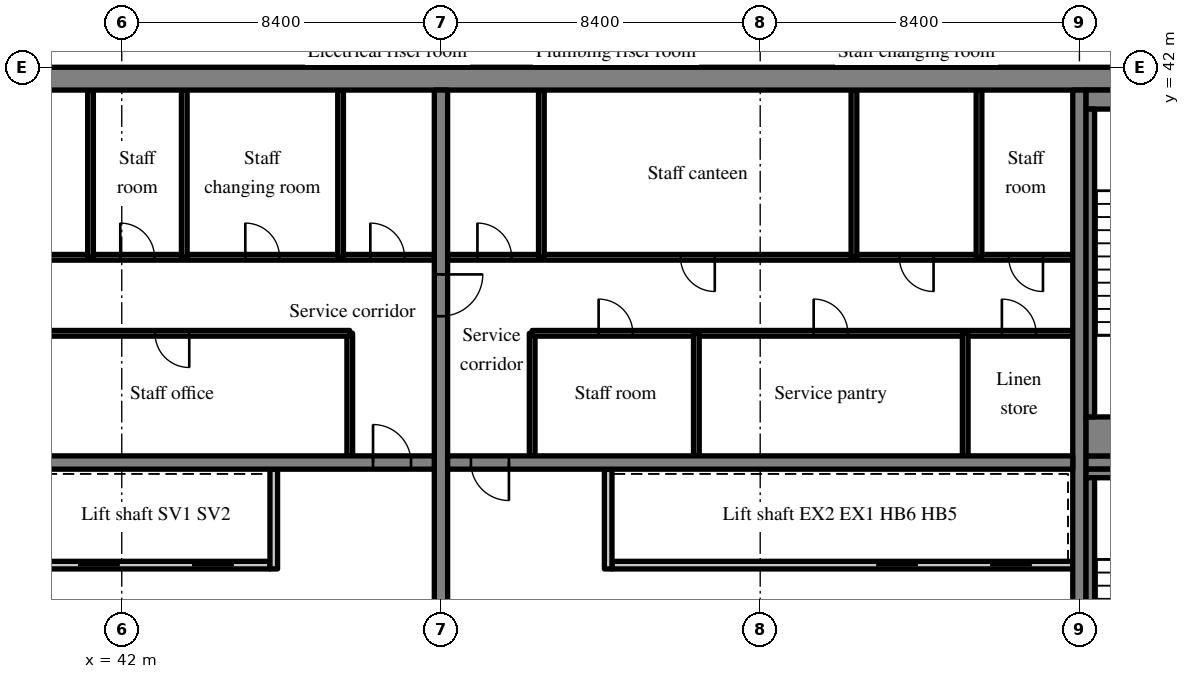
"""IFC4 building model, lengths in metres.
Left out: names, types, materials, properties, quantities, classifications, styles, units other than length and angle.
Written with IfcOpenShell. Run it as: python <this file> out.ifc"""

import sys

from ifc_helpers import new_model, si_unit, direction, frame, frame_2d, origin, place, context, subcontext, project, spatial, rectangle, extrude, source, transform, mapped, element, fill, save


model = new_model("IFC4")
c1 = context("Model", 3, precision=1e-05, world=origin(), true_north=direction((0.0, 1.0)))
c2 = subcontext(c1, "Body", "Model", "MODEL_VIEW")
j1 = project(units=[si_unit("LENGTHUNIT", "METRE"), si_unit("PLANEANGLEUNIT", "RADIAN")], contexts=[c1])
p1 = place(None, origin())
s1 = spatial("IfcSite", under=j1, at=p1, CompositionType="ELEMENT")
p2 = place(p1, origin())
s2 = spatial("IfcBuilding", under=s1, at=p2, CompositionType="ELEMENT")
p3 = place(p2, frame((0.0, 0.0, 221.8)))
s3 = spatial("IfcBuildingStorey", under=s2, at=p3, CompositionType="ELEMENT", Elevation=221.8)
m1 = source(origin(), c2, "Body", "SweptSolid", [
    extrude(rectangle(XDim=50.4, YDim=0.6, at=frame_2d((25.2, 0.0))), origin(), (0.0, 0.0, 1.0), 3.62),
])
p4 = place(p3, frame((25.2, 41.7, 0.0), z_axis=(0.0, 0.0, 1.0), x_axis=(1.0, 0.0, 0.0)))
e1 = element("IfcWall", 1, at=p4, inside=s3, PredefinedType="SHEAR", context=c2, shape_type="MappedRepresentation", body=[
    mapped(m1, transform((0.0, 0.0, 0.0), scale=1.0)),
])
m2 = source(origin(), c2, "Body", "SweptSolid", [
    extrude(rectangle(XDim=18.8, YDim=0.35, at=frame_2d((9.4, 0.0))), origin(), (0.0, 0.0, 1.0), 3.62),
])
p5 = place(p3, frame((50.4, 22.6, 0.0), z_axis=(0.0, 0.0, 1.0), x_axis=(0.0, 1.0, 0.0)))
e2 = element("IfcWall", 2, at=p5, inside=s3, PredefinedType="SHEAR", context=c2, shape_type="MappedRepresentation", body=[
    mapped(m2, transform((0.0, 0.0, 0.0), scale=1.0)),
])
m3 = source(origin(), c2, "Body", "SweptSolid", [
    extrude(rectangle(XDim=1.1, YDim=2.1, at=frame_2d((0.55, 1.05))), frame((0.0, 0.185, 0.0), z_axis=(0.0, -1.0, 0.0), x_axis=(1.0, 0.0, 0.0)), (0.0, 0.0, 1.0), 0.37),
])
p6 = place(p5, frame((12.85, 0.0, 0.0)))
e3 = element("IfcOpeningElement", 3, at=p6, cuts=e2, PredefinedType="OPENING", context=c2, shape_type="MappedRepresentation", body=[
    mapped(m3, transform((0.0, 0.0, 0.0), scale=1.0)),
])
p7 = place(p3, frame((67.2, 22.6, 0.0), z_axis=(0.0, 0.0, 1.0), x_axis=(0.0, 1.0, 0.0)))
e4 = element("IfcWall", 4, at=p7, inside=s3, PredefinedType="SHEAR", context=c2, shape_type="MappedRepresentation", body=[
    mapped(m2, transform((0.0, 0.0, 0.0), scale=1.0)),
])
m4 = source(origin(), c2, "Body", "SweptSolid", [
    extrude(rectangle(XDim=16.45, YDim=0.35, at=frame_2d((8.225, 0.0))), origin(), (0.0, 0.0, 1.0), 3.62),
])
p8 = place(p3, frame((33.775, 31.6, 0.0), z_axis=(0.0, 0.0, 1.0), x_axis=(1.0, 0.0, 0.0)))
e5 = element("IfcWall", 5, at=p8, inside=s3, PredefinedType="SHEAR", context=c2, shape_type="MappedRepresentation", body=[
    mapped(m4, transform((0.0, 0.0, 0.0), scale=1.0)),
])
m5 = source(origin(), c2, "Body", "SweptSolid", [
    extrude(rectangle(XDim=1.0, YDim=2.1, at=frame_2d((0.5, 1.05))), frame((0.0, 0.185, 0.0), z_axis=(0.0, -1.0, 0.0), x_axis=(1.0, 0.0, 0.0)), (0.0, 0.0, 1.0), 0.37),
])
p9 = place(p8, frame((14.837, 0.0, 0.0)))
e6 = element("IfcOpeningElement", 6, at=p9, cuts=e5, PredefinedType="OPENING", context=c2, shape_type="MappedRepresentation", body=[
    mapped(m5, transform((0.0, 0.0, 0.0), scale=1.0)),
])
m6 = source(origin(), c2, "Body", "SweptSolid", [
    extrude(rectangle(XDim=16.45, YDim=0.35, at=frame_2d((8.225, 0.0))), origin(), (0.0, 0.0, 1.0), 3.62),
])
p10 = place(p3, frame((50.575, 31.6, 0.0), z_axis=(0.0, 0.0, 1.0), x_axis=(1.0, 0.0, 0.0)))
e7 = element("IfcWall", 7, at=p10, inside=s3, PredefinedType="SHEAR", context=c2, shape_type="MappedRepresentation", body=[
    mapped(m6, transform((0.0, 0.0, 0.0), scale=1.0)),
])
p11 = place(p10, frame((0.613, 0.0, 0.0)))
e8 = element("IfcOpeningElement", 8, at=p11, cuts=e7, PredefinedType="OPENING", context=c2, shape_type="MappedRepresentation", body=[
    mapped(m5, transform((0.0, 0.0, 0.0), scale=1.0)),
])
m7 = source(origin(), c2, "Body", "SweptSolid", [
    extrude(rectangle(XDim=7.625, YDim=0.35, at=frame_2d((3.812, 0.0))), origin(), (0.0, 0.0, 1.0), 3.62),
])
p12 = place(p3, frame((67.375, 31.6, 0.0), z_axis=(0.0, 0.0, 1.0), x_axis=(1.0, 0.0, 0.0)))
e9 = element("IfcWall", 9, at=p12, inside=s3, PredefinedType="SHEAR", context=c2, shape_type="MappedRepresentation", body=[
    mapped(m7, transform((0.0, 0.0, 0.0), scale=1.0)),
])
p13 = place(p12, frame((5.8, 0.0, 0.0)))
e10 = element("IfcOpeningElement", 10, at=p13, cuts=e9, PredefinedType="OPENING", context=c2, shape_type="MappedRepresentation", body=[
    mapped(m3, transform((0.0, 0.0, 0.0), scale=1.0)),
])
m8 = source(origin(), c2, "Body", "SweptSolid", [
    extrude(rectangle(XDim=6.0, YDim=0.2, at=frame_2d((3.0, 0.0))), origin(), (0.0, 0.0, 1.0), 3.62),
])
p14 = place(p3, frame((39.9, 28.9, 0.0), z_axis=(0.0, 0.0, 1.0), x_axis=(1.0, 0.0, 0.0)))
e11 = element("IfcWall", 11, at=p14, inside=s3, PredefinedType="SOLIDWALL", context=c2, shape_type="MappedRepresentation", body=[
    mapped(m8, transform((0.0, 0.0, 0.0), scale=1.0)),
])
m9 = source(origin(), c2, "Body", "SweptSolid", [
    extrude(rectangle(XDim=1.1, YDim=2.1, at=frame_2d((0.55, 1.05))), frame((0.0, 0.11, 0.0), z_axis=(0.0, -1.0, 0.0), x_axis=(1.0, 0.0, 0.0)), (0.0, 0.0, 1.0), 0.22),
])
p15 = place(p14, frame((0.95, 0.0, 0.0)))
e12 = element("IfcOpeningElement", 12, at=p15, cuts=e11, PredefinedType="OPENING", context=c2, shape_type="MappedRepresentation", body=[
    mapped(m9, transform((0.0, 0.0, 0.0), scale=1.0)),
])
p16 = place(p14, frame((3.95, 0.0, 0.0)))
e13 = element("IfcOpeningElement", 13, at=p16, cuts=e11, PredefinedType="OPENING", context=c2, shape_type="MappedRepresentation", body=[
    mapped(m9, transform((0.0, 0.0, 0.0), scale=1.0)),
])
m10 = source(origin(), c2, "Body", "SweptSolid", [
    extrude(rectangle(XDim=2.625, YDim=0.2, at=frame_2d((1.312, 0.0))), origin(), (0.0, 0.0, 1.0), 3.62),
])
p17 = place(p3, frame((46.0, 28.8, 0.0), z_axis=(0.0, 0.0, 1.0), x_axis=(0.0, 1.0, 0.0)))
e14 = element("IfcWall", 14, at=p17, inside=s3, PredefinedType="SOLIDWALL", context=c2, shape_type="MappedRepresentation", body=[
    mapped(m10, transform((0.0, 0.0, 0.0), scale=1.0)),
])
m11 = source(origin(), c2, "Body", "SweptSolid", [
    extrude(rectangle(XDim=3.225, YDim=0.15, at=frame_2d((1.613, 0.0))), origin(), (0.0, 0.0, 1.0), 3.62),
])
p18 = place(p3, frame((48.0, 31.775, 0.0), z_axis=(0.0, 0.0, 1.0), x_axis=(0.0, 1.0, 0.0)))
e15 = element("IfcWall", 15, at=p18, inside=s3, PredefinedType="PARTITIONING", context=c2, shape_type="MappedRepresentation", body=[
    mapped(m11, transform((0.0, 0.0, 0.0), scale=1.0)),
])
m12 = source(origin(), c2, "Body", "SweptSolid", [
    extrude(rectangle(XDim=14.225, YDim=0.15, at=frame_2d((7.113, 0.0))), origin(), (0.0, 0.0, 1.0), 3.62),
])
p19 = place(p3, frame((33.775, 35.0, 0.0), z_axis=(0.0, 0.0, 1.0), x_axis=(1.0, 0.0, 0.0)))
e16 = element("IfcWall", 16, at=p19, inside=s3, PredefinedType="PARTITIONING", context=c2, shape_type="MappedRepresentation", body=[
    mapped(m12, transform((0.0, 0.0, 0.0), scale=1.0)),
])
m13 = source(origin(), c2, "Body", "SweptSolid", [
    extrude(rectangle(XDim=0.9, YDim=2.1, at=frame_2d((0.45, 1.05))), frame((0.0, 0.085, 0.0), z_axis=(0.0, -1.0, 0.0), x_axis=(1.0, 0.0, 0.0)), (0.0, 0.0, 1.0), 0.17),
])
p20 = place(p19, frame((2.026, 0.0, 0.0)))
e17 = element("IfcOpeningElement", 17, at=p20, cuts=e16, PredefinedType="OPENING", context=c2, shape_type="MappedRepresentation", body=[
    mapped(m13, transform((0.0, 0.0, 0.0), scale=1.0)),
])
p21 = place(p19, frame((9.101, 0.0, 0.0)))
e18 = element("IfcOpeningElement", 18, at=p21, cuts=e16, PredefinedType="OPENING", context=c2, shape_type="MappedRepresentation", body=[
    mapped(m13, transform((0.0, 0.0, 0.0), scale=1.0)),
])
m14 = source(origin(), c2, "Body", "SweptSolid", [
    extrude(rectangle(XDim=16.45, YDim=0.15, at=frame_2d((8.225, 0.0))), origin(), (0.0, 0.0, 1.0), 3.62),
])
p22 = place(p3, frame((33.775, 37.0, 0.0), z_axis=(0.0, 0.0, 1.0), x_axis=(1.0, 0.0, 0.0)))
e19 = element("IfcWall", 19, at=p22, inside=s3, PredefinedType="PARTITIONING", context=c2, shape_type="MappedRepresentation", body=[
    mapped(m14, transform((0.0, 0.0, 0.0), scale=1.0)),
])
p23 = place(p22, frame((3.251, 0.0, 0.0)))
e20 = element("IfcOpeningElement", 20, at=p23, cuts=e19, PredefinedType="OPENING", context=c2, shape_type="MappedRepresentation", body=[
    mapped(m13, transform((0.0, 0.0, 0.0), scale=1.0)),
])
p24 = place(p22, frame((8.186, 0.0, 0.0)))
e21 = element("IfcOpeningElement", 21, at=p24, cuts=e19, PredefinedType="OPENING", context=c2, shape_type="MappedRepresentation", body=[
    mapped(m13, transform((0.0, 0.0, 0.0), scale=1.0)),
])
p25 = place(p22, frame((11.476, 0.0, 0.0)))
e22 = element("IfcOpeningElement", 22, at=p25, cuts=e19, PredefinedType="OPENING", context=c2, shape_type="MappedRepresentation", body=[
    mapped(m13, transform((0.0, 0.0, 0.0), scale=1.0)),
])
p26 = place(p22, frame((14.766, 0.0, 0.0)))
e23 = element("IfcOpeningElement", 23, at=p26, cuts=e19, PredefinedType="OPENING", context=c2, shape_type="MappedRepresentation", body=[
    mapped(m13, transform((0.0, 0.0, 0.0), scale=1.0)),
])
m15 = source(origin(), c2, "Body", "SweptSolid", [
    extrude(rectangle(XDim=4.4, YDim=0.15, at=frame_2d((2.2, 0.0))), origin(), (0.0, 0.0, 1.0), 3.62),
])
for number, where, z_axis, x_axis in (
    (24, (41.178, 37.0, 0.0), (0.0, 0.0, 1.0), (0.0, 1.0, 0.0)),
    (25, (43.645, 37.0, 0.0), (0.0, 0.0, 1.0), (0.0, 1.0, 0.0)),
    (26, (47.758, 37.0, 0.0), (0.0, 0.0, 1.0), (0.0, 1.0, 0.0)),
):
    element("IfcWall", number, at=place(p3, frame(where, z_axis=z_axis, x_axis=x_axis)), inside=s3, PredefinedType="PARTITIONING", context=c2, shape_type="MappedRepresentation", body=[
        mapped(m15, transform((0.0, 0.0, 0.0), scale=1.0)),
    ])
m16 = source(origin(), c2, "Body", "SweptSolid", [
    extrude(rectangle(XDim=12.125, YDim=0.2, at=frame_2d((6.062, 0.0))), origin(), (0.0, 0.0, 1.0), 3.62),
])
p27 = place(p3, frame((67.025, 28.9, 0.0), z_axis=(0.0, 0.0, 1.0), x_axis=(-1.0, 0.0, 0.0)))
e27 = element("IfcWall", 27, at=p27, inside=s3, PredefinedType="SOLIDWALL", context=c2, shape_type="MappedRepresentation", body=[
    mapped(m16, transform((0.0, 0.0, 0.0), scale=1.0)),
])
p28 = place(p27, frame((1.075, 0.0, 0.0)))
e28 = element("IfcOpeningElement", 28, at=p28, cuts=e27, PredefinedType="OPENING", context=c2, shape_type="MappedRepresentation", body=[
    mapped(m9, transform((0.0, 0.0, 0.0), scale=1.0)),
])
p29 = place(p27, frame((4.075, 0.0, 0.0)))
e29 = element("IfcOpeningElement", 29, at=p29, cuts=e27, PredefinedType="OPENING", context=c2, shape_type="MappedRepresentation", body=[
    mapped(m9, transform((0.0, 0.0, 0.0), scale=1.0)),
])
p30 = place(p3, frame((54.8, 28.8, 0.0), z_axis=(0.0, 0.0, 1.0), x_axis=(0.0, 1.0, 0.0)))
e30 = element("IfcWall", 30, at=p30, inside=s3, PredefinedType="SOLIDWALL", context=c2, shape_type="MappedRepresentation", body=[
    mapped(m10, transform((0.0, 0.0, 0.0), scale=1.0)),
])
p31 = place(p3, frame((52.8, 31.775, 0.0), z_axis=(0.0, 0.0, 1.0), x_axis=(0.0, 1.0, 0.0)))
e31 = element("IfcWall", 31, at=p31, inside=s3, PredefinedType="PARTITIONING", context=c2, shape_type="MappedRepresentation", body=[
    mapped(m11, transform((0.0, 0.0, 0.0), scale=1.0)),
])
m17 = source(origin(), c2, "Body", "SweptSolid", [
    extrude(rectangle(XDim=14.225, YDim=0.15, at=frame_2d((7.112, 0.0))), origin(), (0.0, 0.0, 1.0), 3.62),
])
p32 = place(p3, frame((67.025, 35.0, 0.0), z_axis=(0.0, 0.0, 1.0), x_axis=(-1.0, 0.0, 0.0)))
e32 = element("IfcWall", 32, at=p32, inside=s3, PredefinedType="PARTITIONING", context=c2, shape_type="MappedRepresentation", body=[
    mapped(m17, transform((0.0, 0.0, 0.0), scale=1.0)),
])
p33 = place(p32, frame((0.965, 0.0, 0.0)))
e33 = element("IfcOpeningElement", 33, at=p33, cuts=e32, PredefinedType="OPENING", context=c2, shape_type="MappedRepresentation", body=[
    mapped(m13, transform((0.0, 0.0, 0.0), scale=1.0)),
])
p34 = place(p32, frame((5.918, 0.0, 0.0)))
e34 = element("IfcOpeningElement", 34, at=p34, cuts=e32, PredefinedType="OPENING", context=c2, shape_type="MappedRepresentation", body=[
    mapped(m13, transform((0.0, 0.0, 0.0), scale=1.0)),
])
p35 = place(p32, frame((11.577, 0.0, 0.0)))
e35 = element("IfcOpeningElement", 35, at=p35, cuts=e32, PredefinedType="OPENING", context=c2, shape_type="MappedRepresentation", body=[
    mapped(m13, transform((0.0, 0.0, 0.0), scale=1.0)),
])
m18 = source(origin(), c2, "Body", "SweptSolid", [
    extrude(rectangle(XDim=16.45, YDim=0.15, at=frame_2d((8.225, 0.0))), origin(), (0.0, 0.0, 1.0), 3.62),
])
p36 = place(p3, frame((67.025, 37.0, 0.0), z_axis=(0.0, 0.0, 1.0), x_axis=(-1.0, 0.0, 0.0)))
e36 = element("IfcWall", 36, at=p36, inside=s3, PredefinedType="PARTITIONING", context=c2, shape_type="MappedRepresentation", body=[
    mapped(m18, transform((0.0, 0.0, 0.0), scale=1.0)),
])
p37 = place(p36, frame((0.784, 0.0, 0.0)))
e37 = element("IfcOpeningElement", 37, at=p37, cuts=e36, PredefinedType="OPENING", context=c2, shape_type="MappedRepresentation", body=[
    mapped(m13, transform((0.0, 0.0, 0.0), scale=1.0)),
])
p38 = place(p36, frame((3.663, 0.0, 0.0)))
e38 = element("IfcOpeningElement", 38, at=p38, cuts=e36, PredefinedType="OPENING", context=c2, shape_type="MappedRepresentation", body=[
    mapped(m13, transform((0.0, 0.0, 0.0), scale=1.0)),
])
p39 = place(p36, frame((9.42, 0.0, 0.0)))
e39 = element("IfcOpeningElement", 39, at=p39, cuts=e36, PredefinedType="OPENING", context=c2, shape_type="MappedRepresentation", body=[
    mapped(m13, transform((0.0, 0.0, 0.0), scale=1.0)),
])
p40 = place(p36, frame((14.766, 0.0, 0.0)))
e40 = element("IfcOpeningElement", 40, at=p40, cuts=e36, PredefinedType="OPENING", context=c2, shape_type="MappedRepresentation", body=[
    mapped(m13, transform((0.0, 0.0, 0.0), scale=1.0)),
])
for number, where, z_axis, x_axis in (
    (41, (64.195, 31.775, 0.0), (0.0, 0.0, 1.0), (0.0, 1.0, 0.0)),
    (42, (57.12, 31.775, 0.0), (0.0, 0.0, 1.0), (0.0, 1.0, 0.0)),
):
    element("IfcWall", number, at=place(p3, frame(where, z_axis=z_axis, x_axis=x_axis)), inside=s3, PredefinedType="PARTITIONING", context=c2, shape_type="MappedRepresentation", body=[
        mapped(m11, transform((0.0, 0.0, 0.0), scale=1.0)),
    ])
for number, where, z_axis, x_axis in (
    (43, (64.558, 37.0, 0.0), (0.0, 0.0, 1.0), (0.0, 1.0, 0.0)),
    (44, (61.267, 37.0, 0.0), (0.0, 0.0, 1.0), (0.0, 1.0, 0.0)),
    (45, (53.042, 37.0, 0.0), (0.0, 0.0, 1.0), (0.0, 1.0, 0.0)),
):
    element("IfcWall", number, at=place(p3, frame(where, z_axis=z_axis, x_axis=x_axis)), inside=s3, PredefinedType="PARTITIONING", context=c2, shape_type="MappedRepresentation", body=[
        mapped(m15, transform((0.0, 0.0, 0.0), scale=1.0)),
    ])
m19 = source(origin(), c2, "Body", "SweptSolid", [
    extrude(rectangle(XDim=4.875, YDim=0.225, at=frame_2d((2.438, 0.0))), origin(), (0.0, 0.0, 1.0), 3.62),
])
p41 = place(p3, frame((67.375, 31.312, 0.0), z_axis=(0.0, 0.0, 1.0), x_axis=(1.0, 0.0, 0.0)))
e46 = element("IfcWall", 46, at=p41, inside=s3, PredefinedType="SOLIDWALL", context=c2, shape_type="MappedRepresentation", body=[
    mapped(m19, transform((0.0, 0.0, 0.0), scale=1.0)),
])
m20 = source(origin(), c2, "Body", "SweptSolid", [
    extrude(rectangle(XDim=8.1, YDim=0.225, at=frame_2d((4.05, 0.0))), origin(), (0.0, 0.0, 1.0), 3.62),
])
p42 = place(p3, frame((67.487, 23.1, 0.0), z_axis=(0.0, 0.0, 1.0), x_axis=(0.0, 1.0, 0.0)))
e47 = element("IfcWall", 47, at=p42, inside=s3, PredefinedType="SOLIDWALL", context=c2, shape_type="MappedRepresentation", body=[
    mapped(m20, transform((0.0, 0.0, 0.0), scale=1.0)),
])
m21 = source(origin(), c2, "Body", "SweptSolid", [
    extrude(rectangle(XDim=4.875, YDim=0.5, at=frame_2d((2.438, 0.0))), origin(), (0.0, 0.0, 1.0), 3.62),
])
p43 = place(p3, frame((67.375, 41.15, 0.0), z_axis=(0.0, 0.0, 1.0), x_axis=(1.0, 0.0, 0.0)))
e48 = element("IfcWall", 48, at=p43, inside=s3, PredefinedType="SOLIDWALL", context=c2, shape_type="MappedRepresentation", body=[
    mapped(m21, transform((0.0, 0.0, 0.0), scale=1.0)),
])
m22 = source(origin(), c2, "Body", "SweptSolid", [
    extrude(rectangle(XDim=4.875, YDim=1.025, at=frame_2d((2.438, 0.0))), origin(), (0.0, 0.0, 1.0), 3.62),
])
p44 = place(p3, frame((67.375, 32.287, 0.0), z_axis=(0.0, 0.0, 1.0), x_axis=(1.0, 0.0, 0.0)))
e49 = element("IfcWall", 49, at=p44, inside=s3, PredefinedType="SOLIDWALL", context=c2, shape_type="MappedRepresentation", body=[
    mapped(m22, transform((0.0, 0.0, 0.0), scale=1.0)),
])
p45 = place(p3, frame((67.487, 32.8, 0.0), z_axis=(0.0, 0.0, 1.0), x_axis=(0.0, 1.0, 0.0)))
e50 = element("IfcWall", 50, at=p45, inside=s3, PredefinedType="SOLIDWALL", context=c2, shape_type="MappedRepresentation", body=[
    mapped(m20, transform((0.0, 0.0, 0.0), scale=1.0)),
])
m23 = source(origin(), c2, "Body", "SweptSolid", [
    extrude(rectangle(XDim=1.0, YDim=2.1, at=frame_2d((0.5, 1.05))), frame((0.0, 0.025, 0.0), z_axis=(0.0, -1.0, 0.0), x_axis=(1.0, 0.0, 0.0)), (0.0, 0.0, 1.0), 0.05),
])
p46 = place(p9, origin())
e51 = element("IfcDoor", 51, at=p46, inside=s3, OperationType="SINGLE_SWING_LEFT", PredefinedType="DOOR", context=c2, shape_type="MappedRepresentation", body=[
    mapped(m23, transform((0.0, 0.0, 0.0), scale=1.0)),
])
fill(e6, e51)
m24 = source(origin(), c2, "Body", "SweptSolid", [
    extrude(rectangle(XDim=1.1, YDim=2.1, at=frame_2d((0.55, 1.05))), frame((0.0, 0.025, 0.0), z_axis=(0.0, -1.0, 0.0), x_axis=(1.0, 0.0, 0.0)), (0.0, 0.0, 1.0), 0.05),
])
p47 = place(p15, origin())
e52 = element("IfcDoor", 52, at=p47, inside=s3, OperationType="SLIDING_TO_LEFT", PredefinedType="DOOR", context=c2, shape_type="MappedRepresentation", body=[
    mapped(m24, transform((0.0, 0.0, 0.0), scale=1.0)),
])
fill(e12, e52)
p48 = place(p16, origin())
e53 = element("IfcDoor", 53, at=p48, inside=s3, OperationType="SLIDING_TO_RIGHT", PredefinedType="DOOR", context=c2, shape_type="MappedRepresentation", body=[
    mapped(m24, transform((0.0, 0.0, 0.0), scale=1.0)),
])
fill(e13, e53)
m25 = source(origin(), c2, "Body", "SweptSolid", [
    extrude(rectangle(XDim=0.9, YDim=2.1, at=frame_2d((0.45, 1.05))), frame((0.0, 0.025, 0.0), z_axis=(0.0, -1.0, 0.0), x_axis=(1.0, 0.0, 0.0)), (0.0, 0.0, 1.0), 0.05),
])
p49 = place(p21, origin())
e54 = element("IfcDoor", 54, at=p49, inside=s3, OperationType="SINGLE_SWING_RIGHT", PredefinedType="DOOR", context=c2, shape_type="MappedRepresentation", body=[
    mapped(m25, transform((0.0, 0.0, 0.0), scale=1.0)),
])
fill(e18, e54)
p50 = place(p24, origin())
e55 = element("IfcDoor", 55, at=p50, inside=s3, OperationType="SINGLE_SWING_LEFT", PredefinedType="DOOR", context=c2, shape_type="MappedRepresentation", body=[
    mapped(m25, transform((0.0, 0.0, 0.0), scale=1.0)),
])
fill(e21, e55)
p51 = place(p25, origin())
e56 = element("IfcDoor", 56, at=p51, inside=s3, OperationType="SINGLE_SWING_LEFT", PredefinedType="DOOR", context=c2, shape_type="MappedRepresentation", body=[
    mapped(m25, transform((0.0, 0.0, 0.0), scale=1.0)),
])
fill(e22, e56)
p52 = place(p26, origin())
e57 = element("IfcDoor", 57, at=p52, inside=s3, OperationType="SINGLE_SWING_LEFT", PredefinedType="DOOR", context=c2, shape_type="MappedRepresentation", body=[
    mapped(m25, transform((0.0, 0.0, 0.0), scale=1.0)),
])
fill(e23, e57)
p53 = place(p11, origin())
e58 = element("IfcDoor", 58, at=p53, inside=s3, OperationType="SINGLE_SWING_RIGHT", PredefinedType="DOOR", context=c2, shape_type="MappedRepresentation", body=[
    mapped(m23, transform((0.0, 0.0, 0.0), scale=1.0)),
])
fill(e8, e58)
p54 = place(p28, origin())
e59 = element("IfcDoor", 59, at=p54, inside=s3, OperationType="SLIDING_TO_RIGHT", PredefinedType="DOOR", context=c2, shape_type="MappedRepresentation", body=[
    mapped(m24, transform((0.0, 0.0, 0.0), scale=1.0)),
])
fill(e28, e59)
p55 = place(p29, origin())
e60 = element("IfcDoor", 60, at=p55, inside=s3, OperationType="SLIDING_TO_LEFT", PredefinedType="DOOR", context=c2, shape_type="MappedRepresentation", body=[
    mapped(m24, transform((0.0, 0.0, 0.0), scale=1.0)),
])
fill(e29, e60)
p56 = place(p33, origin())
e61 = element("IfcDoor", 61, at=p56, inside=s3, OperationType="SINGLE_SWING_RIGHT", PredefinedType="DOOR", context=c2, shape_type="MappedRepresentation", body=[
    mapped(m25, transform((0.0, 0.0, 0.0), scale=1.0)),
])
fill(e33, e61)
p57 = place(p34, origin())
e62 = element("IfcDoor", 62, at=p57, inside=s3, OperationType="SINGLE_SWING_RIGHT", PredefinedType="DOOR", context=c2, shape_type="MappedRepresentation", body=[
    mapped(m25, transform((0.0, 0.0, 0.0), scale=1.0)),
])
fill(e34, e62)
p58 = place(p35, origin())
e63 = element("IfcDoor", 63, at=p58, inside=s3, OperationType="SINGLE_SWING_RIGHT", PredefinedType="DOOR", context=c2, shape_type="MappedRepresentation", body=[
    mapped(m25, transform((0.0, 0.0, 0.0), scale=1.0)),
])
fill(e35, e63)
p59 = place(p37, origin())
e64 = element("IfcDoor", 64, at=p59, inside=s3, OperationType="SINGLE_SWING_LEFT", PredefinedType="DOOR", context=c2, shape_type="MappedRepresentation", body=[
    mapped(m25, transform((0.0, 0.0, 0.0), scale=1.0)),
])
fill(e37, e64)
p60 = place(p38, origin())
e65 = element("IfcDoor", 65, at=p60, inside=s3, OperationType="SINGLE_SWING_LEFT", PredefinedType="DOOR", context=c2, shape_type="MappedRepresentation", body=[
    mapped(m25, transform((0.0, 0.0, 0.0), scale=1.0)),
])
fill(e38, e65)
p61 = place(p39, origin())
e66 = element("IfcDoor", 66, at=p61, inside=s3, OperationType="SINGLE_SWING_LEFT", PredefinedType="DOOR", context=c2, shape_type="MappedRepresentation", body=[
    mapped(m25, transform((0.0, 0.0, 0.0), scale=1.0)),
])
fill(e39, e66)
p62 = place(p40, origin())
e67 = element("IfcDoor", 67, at=p62, inside=s3, OperationType="SINGLE_SWING_RIGHT", PredefinedType="DOOR", context=c2, shape_type="MappedRepresentation", body=[
    mapped(m25, transform((0.0, 0.0, 0.0), scale=1.0)),
])
fill(e40, e67)
p63 = place(p6, origin())
e68 = element("IfcDoor", 68, at=p63, inside=s3, OperationType="SINGLE_SWING_RIGHT", PredefinedType="DOOR", context=c2, shape_type="MappedRepresentation", body=[
    mapped(m24, transform((0.0, 0.0, 0.0), scale=1.0)),
])
fill(e3, e68)
save(model, sys.argv[1])
